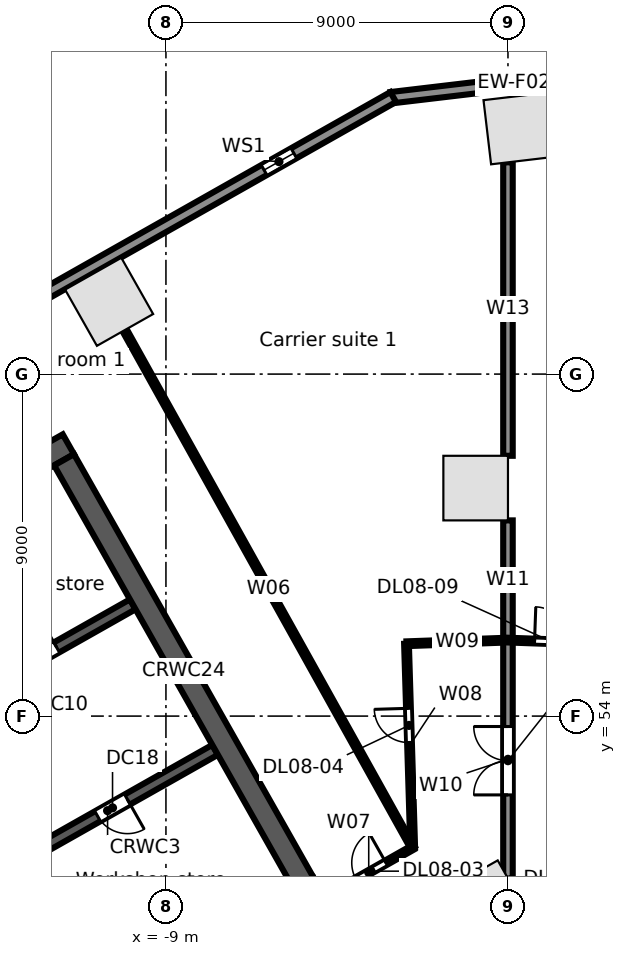
"""IFC4 building model, lengths in metres.
Left out: names, types, materials, properties, quantities, classifications, styles, units other than length and angle.
Written with IfcOpenShell. Run it as: python <this file> out.ifc"""

import sys

from ifc_helpers import new_model, si_unit, direction, frame, frame_2d, origin, origin_2d, place, context, subcontext, project, spatial, rectangle, extrude, element, fill, save


model = new_model("IFC4")
c1 = context("Model", 3, precision=1e-05, world=origin(), true_north=direction((0.0, 1.0)))
c2 = subcontext(c1, "Body", "Model", "MODEL_VIEW")
j1 = project(units=[si_unit("LENGTHUNIT", "METRE"), si_unit("PLANEANGLEUNIT", "RADIAN")], contexts=[c1])
p1 = place(None, origin())
s1 = spatial("IfcSite", under=j1, at=p1, CompositionType="ELEMENT")
p2 = place(p1, origin())
s2 = spatial("IfcBuilding", under=s1, at=p2, CompositionType="ELEMENT")
p3 = place(p2, frame((0.0, 0.0, 41.5)))
s3 = spatial("IfcBuildingStorey", under=s2, at=p3, CompositionType="ELEMENT", Elevation=41.5)
for number, where, z_axis, x_axis in (
    (1, (0.3, 69.464, 0.0), (0.0, 0.0, 1.0), (-0.993, -0.118, 0.0)),
    (2, (-10.495, 64.902, 0.0), (0.0, 0.0, 1.0), (-0.87, -0.492, 0.0)),
    (3, (-0.591, 49.044, 0.0), (0.0, 0.0, 1.0), (0.87, 0.492, 0.0)),
    (4, (-0.85, 60.0, 0.0), (0.0, 0.0, 1.0), (0.0, 1.0, 0.0)),
):
    element("IfcColumn", number, at=place(p3, frame(where, z_axis=z_axis, x_axis=x_axis)), inside=s3, PredefinedType="COLUMN", context=c2, shape_type="SweptSolid", body=[
        extrude(rectangle(XDim=1.7, YDim=1.7, at=origin_2d()), origin(), (0.0, 0.0, 1.0), 5.0),
    ])
p4 = place(p3, frame((-3.076, 70.273, 0.0), z_axis=(0.0, 0.0, 1.0), x_axis=(0.993067743007, 0.117543429416, 0.0)))
e5 = element("IfcWall", 5, at=p4, inside=s3, PredefinedType="STANDARD", context=c2, shape_type="SweptSolid", body=[
    extrude(rectangle(XDim=6.516, YDim=0.3, at=frame_2d((3.258, 0.0))), origin(), (0.0, 0.0, 1.0), 4.68),
])
p5 = place(p3, frame((-58.745, 38.764, 0.0), z_axis=(0.0, 0.0, 1.0), x_axis=(0.870355811726, 0.492423355453, 0.0)))
e6 = element("IfcWall", 6, at=p5, inside=s3, PredefinedType="STANDARD", context=c2, shape_type="SweptSolid", body=[
    extrude(rectangle(XDim=64.025, YDim=0.3, at=frame_2d((32.013, 0.0))), origin(), (0.0, 0.0, 1.0), 4.68),
])
p6 = place(p5, frame((60.122, 0.0, 0.6)))
e7 = element("IfcOpeningElement", 7, at=p6, cuts=e6, PredefinedType="OPENING", context=c2, shape_type="SweptSolid", body=[
    extrude(rectangle(XDim=0.9, YDim=3.2, at=frame_2d((0.45, 1.6))), frame((0.0, 0.16, 0.0), z_axis=(0.0, -1.0, 0.0), x_axis=(1.0, 0.0, 0.0)), (0.0, 0.0, 1.0), 0.32),
])
p7 = place(p5, frame((50.992, 0.0, 0.6)))
e8 = element("IfcOpeningElement", 8, at=p7, cuts=e6, PredefinedType="OPENING", context=c2, shape_type="SweptSolid", body=[
    extrude(rectangle(XDim=0.9, YDim=3.2, at=frame_2d((0.45, 1.6))), frame((0.0, 0.16, 0.0), z_axis=(0.0, -1.0, 0.0), x_axis=(1.0, 0.0, 0.0)), (0.0, 0.0, 1.0), 0.32),
])
p8 = place(p5, frame((41.862, 0.0, 0.6)))
e9 = element("IfcOpeningElement", 9, at=p8, cuts=e6, PredefinedType="OPENING", context=c2, shape_type="SweptSolid", body=[
    extrude(rectangle(XDim=0.9, YDim=3.2, at=frame_2d((0.45, 1.6))), frame((0.0, 0.16, 0.0), z_axis=(0.0, -1.0, 0.0), x_axis=(1.0, 0.0, 0.0)), (0.0, 0.0, 1.0), 0.32),
])
p9 = place(p5, frame((32.732, 0.0, 0.6)))
e10 = element("IfcOpeningElement", 10, at=p9, cuts=e6, PredefinedType="OPENING", context=c2, shape_type="SweptSolid", body=[
    extrude(rectangle(XDim=0.9, YDim=3.2, at=frame_2d((0.45, 1.6))), frame((0.0, 0.16, 0.0), z_axis=(0.0, -1.0, 0.0), x_axis=(1.0, 0.0, 0.0)), (0.0, 0.0, 1.0), 0.32),
])
p10 = place(p5, frame((23.602, 0.0, 0.6)))
e11 = element("IfcOpeningElement", 11, at=p10, cuts=e6, PredefinedType="OPENING", context=c2, shape_type="SweptSolid", body=[
    extrude(rectangle(XDim=0.9, YDim=3.2, at=frame_2d((0.45, 1.6))), frame((0.0, 0.16, 0.0), z_axis=(0.0, -1.0, 0.0), x_axis=(1.0, 0.0, 0.0)), (0.0, 0.0, 1.0), 0.32),
])
p11 = place(p5, frame((14.472, 0.0, 0.6)))
e12 = element("IfcOpeningElement", 12, at=p11, cuts=e6, PredefinedType="OPENING", context=c2, shape_type="SweptSolid", body=[
    extrude(rectangle(XDim=0.9, YDim=3.2, at=frame_2d((0.45, 1.6))), frame((0.0, 0.16, 0.0), z_axis=(0.0, -1.0, 0.0), x_axis=(1.0, 0.0, 0.0)), (0.0, 0.0, 1.0), 0.32),
])
p12 = place(p5, frame((5.342, 0.0, 0.6)))
e13 = element("IfcOpeningElement", 13, at=p12, cuts=e6, PredefinedType="OPENING", context=c2, shape_type="SweptSolid", body=[
    extrude(rectangle(XDim=0.9, YDim=3.2, at=frame_2d((0.45, 1.6))), frame((0.0, 0.16, 0.0), z_axis=(0.0, -1.0, 0.0), x_axis=(1.0, 0.0, 0.0)), (0.0, 0.0, 1.0), 0.32),
])
p13 = place(p3, frame((-13.365, 49.911, 0.0), z_axis=(0.0, 0.0, 1.0), x_axis=(0.870340995471, 0.49244954219, 0.0)))
e14 = element("IfcWall", 14, at=p13, inside=s3, PredefinedType="SOLIDWALL", context=c2, shape_type="SweptSolid", body=[
    extrude(rectangle(XDim=6.5, YDim=0.3, at=frame_2d((3.25, 0.0))), origin(), (0.0, 0.0, 1.0), 4.68),
])
p14 = place(p13, frame((2.95, 0.0, 0.0)))
e15 = element("IfcOpeningElement", 15, at=p14, cuts=e14, PredefinedType="OPENING", context=c2, shape_type="SweptSolid", body=[
    extrude(rectangle(XDim=0.9, YDim=2.1, at=frame_2d((0.45, 1.05))), frame((0.0, 0.16, 0.0), z_axis=(0.0, -1.0, 0.0), x_axis=(1.0, 0.0, 0.0)), (0.0, 0.0, 1.0), 0.32),
])
p15 = place(p3, frame((-15.618, 53.691, 0.0), z_axis=(0.0, 0.0, 1.0), x_axis=(0.870356769198, 0.492421663121, 0.0)))
e16 = element("IfcWall", 16, at=p15, inside=s3, PredefinedType="SOLIDWALL", context=c2, shape_type="SweptSolid", body=[
    extrude(rectangle(XDim=6.6, YDim=0.3, at=frame_2d((3.3, 0.0))), origin(), (0.0, 0.0, 1.0), 4.68),
])
p16 = place(p15, frame((3.4, 0.0, 0.0)))
e17 = element("IfcOpeningElement", 17, at=p16, cuts=e16, PredefinedType="OPENING", context=c2, shape_type="SweptSolid", body=[
    extrude(rectangle(XDim=0.9, YDim=2.1, at=frame_2d((0.45, 1.05))), frame((0.0, 0.16, 0.0), z_axis=(0.0, -1.0, 0.0), x_axis=(1.0, 0.0, 0.0)), (0.0, 0.0, 1.0), 0.32),
])
p17 = place(p3, frame((-24.623, 53.767, 0.0), z_axis=(0.0, 0.0, 1.0), x_axis=(0.870356627484, 0.492421913601, 0.0)))
e18 = element("IfcWall", 18, at=p17, inside=s3, PredefinedType="SOLIDWALL", context=c2, shape_type="SweptSolid", body=[
    extrude(rectangle(XDim=15.0, YDim=0.6, at=frame_2d((7.5, 0.0))), origin(), (0.0, 0.0, 1.0), 4.68),
])
p18 = place(p3, frame((-13.291, 49.781, 0.0), z_axis=(0.0, 0.0, 1.0), x_axis=(0.492394910396, -0.870371904542, 0.0)))
e19 = element("IfcWall", 19, at=p18, inside=s3, PredefinedType="SOLIDWALL", context=c2, shape_type="SweptSolid", body=[
    extrude(rectangle(XDim=4.05, YDim=0.3, at=frame_2d((2.025, 0.0))), origin(), (0.0, 0.0, 1.0), 4.68),
])
p19 = place(p3, frame((-11.681, 60.744, 0.0), z_axis=(0.0, 0.0, 1.0), x_axis=(0.492426772896, -0.870353878221, 0.0)))
e20 = element("IfcWall", 20, at=p19, inside=s3, PredefinedType="SOLIDWALL", context=c2, shape_type="SweptSolid", body=[
    extrude(rectangle(XDim=12.8, YDim=0.6, at=frame_2d((6.4, 0.0))), origin(), (0.0, 0.0, 1.0), 4.68),
])
p20 = place(p3, frame((-10.088, 64.155, 0.0), z_axis=(0.0, 0.0, 1.0), x_axis=(0.486446127767, -0.873710572661, 0.0)))
e21 = element("IfcWall", 21, at=p20, inside=s3, PredefinedType="PARTITIONING", context=c2, shape_type="SweptSolid", body=[
    extrude(rectangle(XDim=15.584, YDim=0.125, at=frame_2d((7.792, 0.0))), origin(), (0.0, 0.0, 1.0), 3.76),
])
p21 = place(p3, frame((-4.821, 49.23, 0.0), z_axis=(0.0, 0.0, 1.0), x_axis=(0.870371217631, 0.492396124598, 0.0)))
e22 = element("IfcWall", 22, at=p21, inside=s3, PredefinedType="PARTITIONING", context=c2, shape_type="SweptSolid", body=[
    extrude(rectangle(XDim=2.659, YDim=0.125, at=frame_2d((1.329, 0.0))), origin(), (0.0, 0.0, 1.0), 4.68),
])
p22 = place(p21, frame((0.95, 0.0, 0.0)))
e23 = element("IfcOpeningElement", 23, at=p22, cuts=e22, PredefinedType="OPENING", context=c2, shape_type="SweptSolid", body=[
    extrude(rectangle(XDim=0.9, YDim=2.1, at=frame_2d((0.45, 1.05))), frame((0.0, 0.073, 0.0), z_axis=(0.0, -1.0, 0.0), x_axis=(1.0, 0.0, 0.0)), (0.0, 0.0, 1.0), 0.145),
])
p23 = place(p3, frame((-2.67, 55.904, 0.0), z_axis=(0.0, 0.0, 1.0), x_axis=(0.030338701418, -0.999539675649, 0.0)))
e24 = element("IfcWall", 24, at=p23, inside=s3, PredefinedType="PARTITIONING", context=c2, shape_type="SweptSolid", body=[
    extrude(rectangle(XDim=5.367, YDim=0.125, at=frame_2d((2.684, 0.0))), origin(), (0.0, 0.0, 1.0), 4.68),
])
p24 = place(p23, frame((1.7, 0.0, 0.0)))
e25 = element("IfcOpeningElement", 25, at=p24, cuts=e24, PredefinedType="OPENING", context=c2, shape_type="SweptSolid", body=[
    extrude(rectangle(XDim=0.9, YDim=2.1, at=frame_2d((0.45, 1.05))), frame((0.0, 0.073, 0.0), z_axis=(0.0, -1.0, 0.0), x_axis=(1.0, 0.0, 0.0)), (0.0, 0.0, 1.0), 0.145),
])
p25 = place(p3, frame((-2.67, 55.904, 0.0), z_axis=(0.0, 0.0, 1.0), x_axis=(0.999354913865, 0.03591317494, 0.0)))
e26 = element("IfcWall", 26, at=p25, inside=s3, PredefinedType="PARTITIONING", context=c2, shape_type="SweptSolid", body=[
    extrude(rectangle(XDim=2.672, YDim=0.125, at=frame_2d((1.336, 0.0))), origin(), (0.0, 0.0, 1.0), 3.742),
])
p26 = place(p3, frame((0.0, 49.726, 0.0), z_axis=(0.0, 0.0, 1.0), x_axis=(0.0, 1.0, 0.0)))
e27 = element("IfcWall", 27, at=p26, inside=s3, PredefinedType="PARTITIONING", context=c2, shape_type="SweptSolid", body=[
    extrude(rectangle(XDim=6.274, YDim=0.25, at=frame_2d((3.137, 0.0))), origin(), (0.0, 0.0, 1.0), 4.68),
])
p27 = place(p26, frame((2.2, 0.0, 0.0)))
e28 = element("IfcOpeningElement", 28, at=p27, cuts=e27, PredefinedType="OPENING", context=c2, shape_type="SweptSolid", body=[
    extrude(rectangle(XDim=1.8, YDim=2.1, at=frame_2d((0.9, 1.05))), frame((0.0, 0.135, 0.0), z_axis=(0.0, -1.0, 0.0), x_axis=(1.0, 0.0, 0.0)), (0.0, 0.0, 1.0), 0.27),
])
p28 = place(p3, frame((0.0, 56.0, 0.0), z_axis=(0.0, 0.0, 1.0), x_axis=(0.0, 1.0, 0.0)))
e29 = element("IfcWall", 29, at=p28, inside=s3, PredefinedType="PARTITIONING", context=c2, shape_type="SweptSolid", body=[
    extrude(rectangle(XDim=3.15, YDim=0.25, at=frame_2d((1.575, 0.0))), origin(), (0.0, 0.0, 1.0), 4.68),
])
p29 = place(p3, frame((0.0, 56.0, 0.0), z_axis=(0.0, 0.0, 1.0), x_axis=(0.999349313684, -0.036068673934, 0.0)))
e30 = element("IfcWall", 30, at=p29, inside=s3, PredefinedType="PARTITIONING", context=c2, shape_type="SweptSolid", body=[
    extrude(rectangle(XDim=2.471, YDim=0.125, at=frame_2d((1.235, 0.0))), origin(), (0.0, 0.0, 1.0), 4.68),
])
p30 = place(p29, frame((0.7, 0.0, 0.0)))
e31 = element("IfcOpeningElement", 31, at=p30, cuts=e30, PredefinedType="OPENING", context=c2, shape_type="SweptSolid", body=[
    extrude(rectangle(XDim=0.9, YDim=2.1, at=frame_2d((0.45, 1.05))), frame((0.0, 0.073, 0.0), z_axis=(0.0, -1.0, 0.0), x_axis=(1.0, 0.0, 0.0)), (0.0, 0.0, 1.0), 0.145),
])
p31 = place(p3, frame((0.0, 60.85, 0.0), z_axis=(0.0, 0.0, 1.0), x_axis=(0.0, 1.0, 0.0)))
e32 = element("IfcWall", 32, at=p31, inside=s3, PredefinedType="PARTITIONING", context=c2, shape_type="SweptSolid", body=[
    extrude(rectangle(XDim=7.723, YDim=0.25, at=frame_2d((3.861, 0.0))), origin(), (0.0, 0.0, 1.0), 3.952),
])
p32 = place(p6, origin())
e33 = element("IfcWindow", 33, at=p32, inside=s3, PartitioningType="SINGLE_PANEL", PredefinedType="WINDOW", context=c2, shape_type="SweptSolid", body=[
    extrude(rectangle(XDim=0.9, YDim=3.2, at=frame_2d((0.45, 1.6))), frame((0.0, 0.03, 0.0), z_axis=(0.0, -1.0, 0.0), x_axis=(1.0, 0.0, 0.0)), (0.0, 0.0, 1.0), 0.06),
])
fill(e7, e33)
p33 = place(p16, origin())
e34 = element("IfcDoor", 34, at=p33, inside=s3, OperationType="SINGLE_SWING_RIGHT", PredefinedType="DOOR", context=c2, shape_type="SweptSolid", body=[
    extrude(rectangle(XDim=0.9, YDim=2.1, at=frame_2d((0.45, 1.05))), frame((0.0, 0.025, 0.0), z_axis=(0.0, -1.0, 0.0), x_axis=(1.0, 0.0, 0.0)), (0.0, 0.0, 1.0), 0.05),
])
fill(e17, e34)
p34 = place(p14, frame((0.9, 0.0, 0.0), z_axis=(0.0, 0.0, 1.0), x_axis=(-1.0, 0.0, 0.0)))
e35 = element("IfcDoor", 35, at=p34, inside=s3, OperationType="SINGLE_SWING_LEFT", PredefinedType="DOOR", context=c2, shape_type="SweptSolid", body=[
    extrude(rectangle(XDim=0.9, YDim=2.1, at=frame_2d((0.45, 1.05))), frame((0.0, 0.025, 0.0), z_axis=(0.0, -1.0, 0.0), x_axis=(1.0, 0.0, 0.0)), (0.0, 0.0, 1.0), 0.05),
])
fill(e15, e35)
p35 = place(p22, origin())
e36 = element("IfcDoor", 36, at=p35, inside=s3, OperationType="SINGLE_SWING_RIGHT", PredefinedType="DOOR", context=c2, shape_type="SweptSolid", body=[
    extrude(rectangle(XDim=0.9, YDim=2.1, at=frame_2d((0.45, 1.05))), frame((0.0, 0.025, 0.0), z_axis=(0.0, -1.0, 0.0), x_axis=(1.0, 0.0, 0.0)), (0.0, 0.0, 1.0), 0.05),
])
fill(e23, e36)
p36 = place(p24, frame((0.9, 0.0, 0.0), z_axis=(0.0, 0.0, 1.0), x_axis=(-1.0, 0.0, 0.0)))
e37 = element("IfcDoor", 37, at=p36, inside=s3, OperationType="SINGLE_SWING_RIGHT", PredefinedType="DOOR", context=c2, shape_type="SweptSolid", body=[
    extrude(rectangle(XDim=0.9, YDim=2.1, at=frame_2d((0.45, 1.05))), frame((0.0, 0.025, 0.0), z_axis=(0.0, -1.0, 0.0), x_axis=(1.0, 0.0, 0.0)), (0.0, 0.0, 1.0), 0.05),
])
fill(e25, e37)
p37 = place(p30, origin())
e38 = element("IfcDoor", 38, at=p37, inside=s3, OperationType="SINGLE_SWING_LEFT", PredefinedType="DOOR", context=c2, shape_type="SweptSolid", body=[
    extrude(rectangle(XDim=0.9, YDim=2.1, at=frame_2d((0.45, 1.05))), frame((0.0, 0.025, 0.0), z_axis=(0.0, -1.0, 0.0), x_axis=(1.0, 0.0, 0.0)), (0.0, 0.0, 1.0), 0.05),
])
fill(e31, e38)
p38 = place(p27, origin())
e39 = element("IfcDoor", 39, at=p38, inside=s3, OperationType="DOUBLE_DOOR_SINGLE_SWING", PredefinedType="DOOR", context=c2, shape_type="SweptSolid", body=[
    extrude(rectangle(XDim=1.8, YDim=2.1, at=frame_2d((0.9, 1.05))), frame((0.0, 0.025, 0.0), z_axis=(0.0, -1.0, 0.0), x_axis=(1.0, 0.0, 0.0)), (0.0, 0.0, 1.0), 0.05),
])
fill(e28, e39)
save(model, sys.argv[1])
